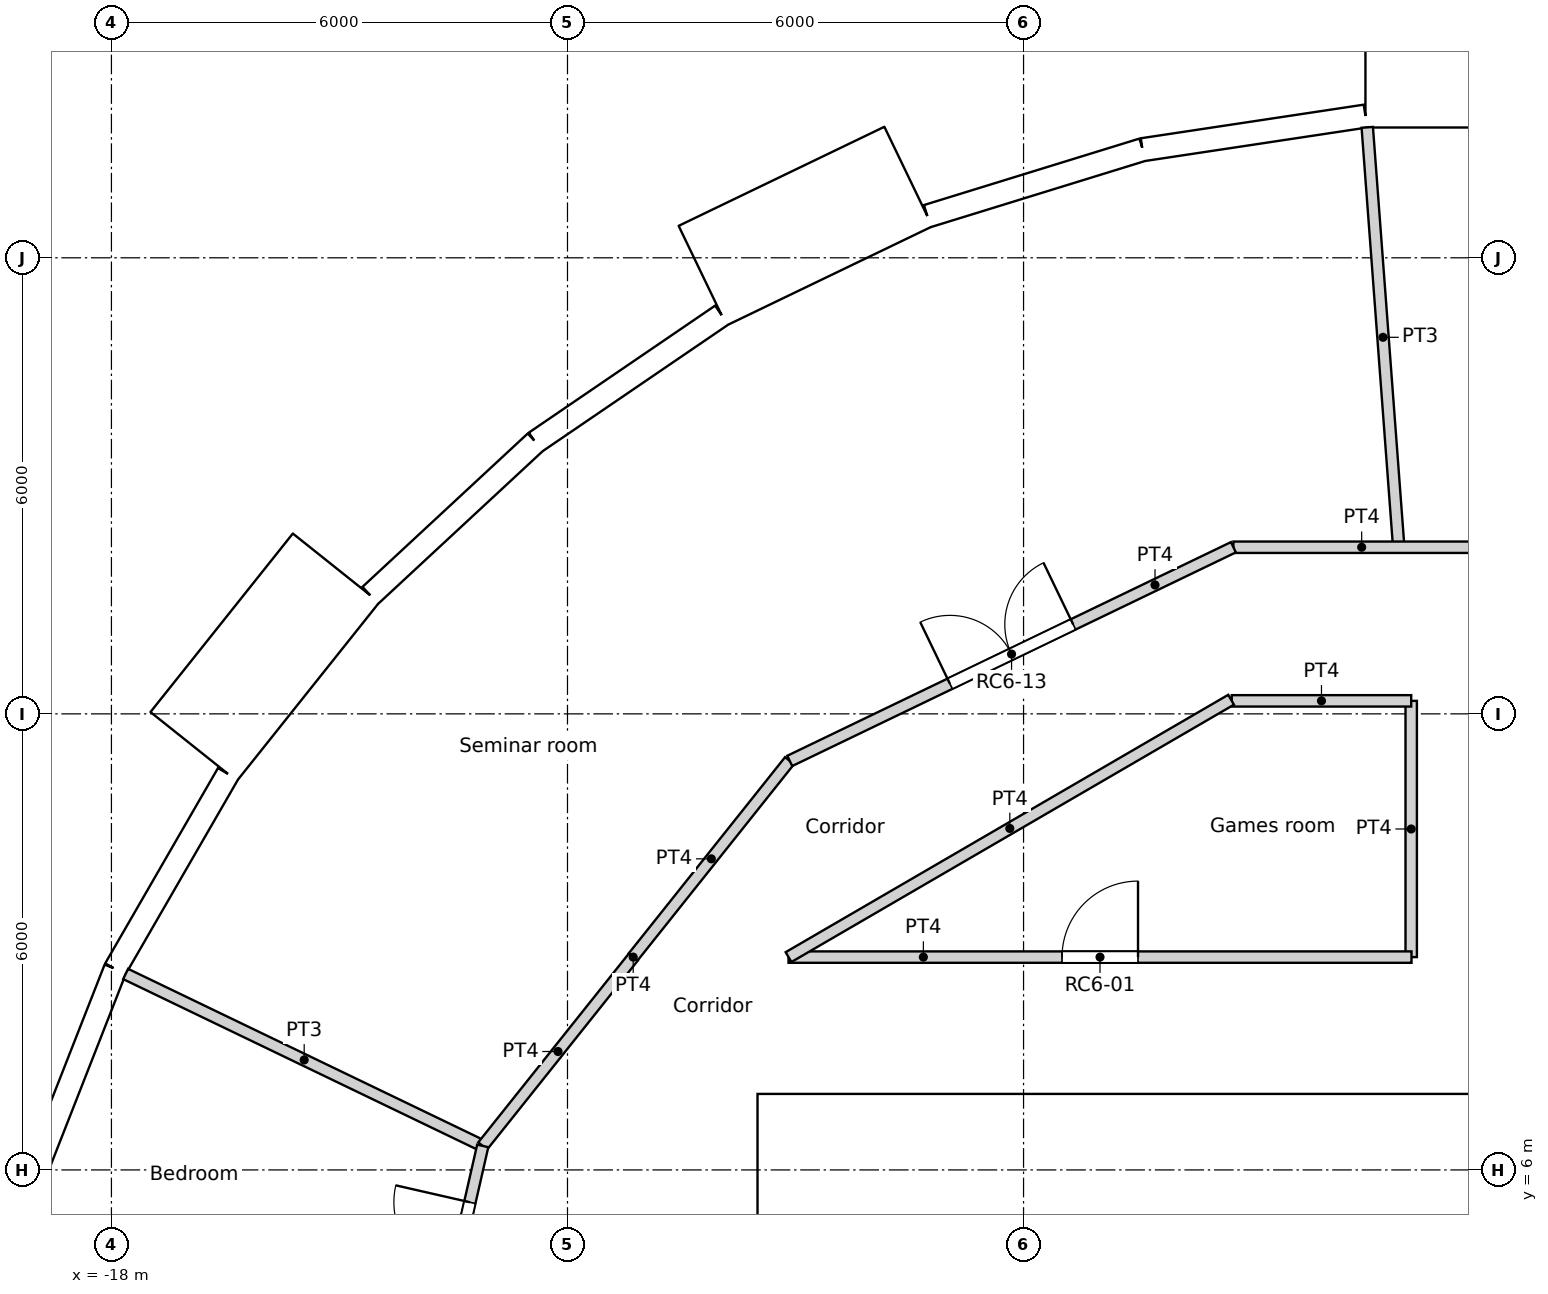
"""IFC4 building model, lengths in metres.
Left out: names, types, materials, properties, quantities, classifications, styles, units other than length and angle.
Written with IfcOpenShell. Run it as: python <this file> out.ifc"""

import sys

from ifc_helpers import new_model, si_unit, direction, frame, frame_2d, origin, origin_2d, place, context, subcontext, project, spatial, rectangle, circle, extrude, element, fill, save


model = new_model("IFC4")
c1 = context("Model", 3, precision=1e-05, world=origin(), true_north=direction((0.0, 1.0)))
c2 = subcontext(c1, "Body", "Model", "MODEL_VIEW")
j1 = project(units=[si_unit("LENGTHUNIT", "METRE"), si_unit("PLANEANGLEUNIT", "RADIAN")], contexts=[c1])
p1 = place(None, origin())
s1 = spatial("IfcSite", under=j1, at=p1, CompositionType="ELEMENT")
p2 = place(p1, origin())
s2 = spatial("IfcBuilding", under=s1, at=p2, CompositionType="ELEMENT")
p3 = place(p2, frame((0.0, 0.0, 283.8)))
s3 = spatial("IfcBuildingStorey", under=s2, at=p3, CompositionType="ELEMENT", Elevation=283.8)
for number, where, z_axis, x_axis in (
    (1, (-4.188, 18.35, 0.0), (0.0, 0.0, 1.0), (1.0, 0.0, 0.0)),
    (2, (-9.411, 16.301, 0.0), (0.0, 0.0, 1.0), (1.0, 0.0, 0.0)),
    (3, (-13.798, 12.802, 0.0), (0.0, 0.0, 1.0), (1.0, 0.0, 0.0)),
    (4, (-16.958, 8.167, 0.0), (0.0, 0.0, 1.0), (1.0, 0.0, 0.0)),
):
    element("IfcColumn", number, at=place(p3, frame(where, z_axis=z_axis, x_axis=x_axis)), inside=s3, PredefinedType="COLUMN", context=c2, shape_type="SweptSolid", body=[
        extrude(circle(Radius=0.45, at=origin_2d()), origin(), (0.0, 0.0, 1.0), 3.6),
    ])
p4 = place(p3, frame((1.5, 20.441, -0.35), z_axis=(0.0, 0.0, 1.0), x_axis=(-1.0, 0.0, 0.0)))
e5 = element("IfcWall", 5, at=p4, inside=s3, PredefinedType="ELEMENTEDWALL", context=c2, shape_type="SweptSolid", body=[
    extrude(rectangle(XDim=3.0, YDim=1.45, at=frame_2d((1.5, 0.0))), origin(), (0.0, 0.0, 1.0), 3.6),
])
p5 = place(p4, frame((1.5, 0.0, 1.9)))
e6 = element("IfcOpeningElement", 6, at=p5, cuts=e5, PredefinedType="OPENING", context=c2, shape_type="SweptSolid", body=[
    extrude(circle(Radius=0.9, at=origin_2d()), frame((0.0, 0.735, 0.0), z_axis=(0.0, -1.0, 0.0), x_axis=(1.0, 0.0, 0.0)), (0.0, 0.0, 1.0), 1.47),
])
p6 = place(p3, frame((-1.504, 19.864, 0.0), z_axis=(0.0, 0.0, 1.0), x_axis=(-0.988835775663, -0.149009425104, 0.0)))
e7 = element("IfcWall", 7, at=p6, inside=s3, PredefinedType="SOLIDWALL", context=c2, shape_type="SweptSolid", body=[
    extrude(rectangle(XDim=2.962, YDim=0.3, at=frame_2d((1.481, 0.0))), origin(), (0.0, 0.0, 1.0), 3.25),
])
p7 = place(p6, frame((1.481, 0.0, 1.55)))
e8 = element("IfcOpeningElement", 8, at=p7, cuts=e7, PredefinedType="OPENING", context=c2, shape_type="SweptSolid", body=[
    extrude(circle(Radius=0.9, at=origin_2d()), frame((0.0, 0.16, 0.0), z_axis=(0.0, -1.0, 0.0), x_axis=(1.0, 0.0, 0.0)), (0.0, 0.0, 1.0), 0.32),
])
p8 = place(p3, frame((-4.433, 19.422, 0.0), z_axis=(0.0, 0.0, 1.0), x_axis=(-0.955555982805, -0.29480970765, 0.0)))
e9 = element("IfcWall", 9, at=p8, inside=s3, PredefinedType="SOLIDWALL", context=c2, shape_type="SweptSolid", body=[
    extrude(rectangle(XDim=2.962, YDim=0.3, at=frame_2d((1.481, 0.0))), origin(), (0.0, 0.0, 1.0), 3.25),
])
p9 = place(p8, frame((1.481, 0.0, 1.55)))
e10 = element("IfcOpeningElement", 10, at=p9, cuts=e9, PredefinedType="OPENING", context=c2, shape_type="SweptSolid", body=[
    extrude(circle(Radius=0.9, at=origin_2d()), frame((0.0, 0.16, 0.0), z_axis=(0.0, -1.0, 0.0), x_axis=(1.0, 0.0, 0.0)), (0.0, 0.0, 1.0), 0.32),
])
p10 = place(p3, frame((-7.518, 19.068, -0.35), z_axis=(0.0, 0.0, 1.0), x_axis=(-0.900953362039, -0.433915935904, 0.0)))
e11 = element("IfcWall", 11, at=p10, inside=s3, PredefinedType="ELEMENTEDWALL", context=c2, shape_type="SweptSolid", body=[
    extrude(rectangle(XDim=3.0, YDim=1.45, at=frame_2d((1.5, 0.0))), origin(), (0.0, 0.0, 1.0), 3.6),
])
p11 = place(p10, frame((1.5, 0.0, 1.9)))
e12 = element("IfcOpeningElement", 12, at=p11, cuts=e11, PredefinedType="OPENING", context=c2, shape_type="SweptSolid", body=[
    extrude(circle(Radius=0.9, at=origin_2d()), frame((0.0, 0.735, 0.0), z_axis=(0.0, -1.0, 0.0), x_axis=(1.0, 0.0, 0.0)), (0.0, 0.0, 1.0), 1.47),
])
p12 = place(p3, frame((-9.974, 17.244, 0.0), z_axis=(0.0, 0.0, 1.0), x_axis=(-0.826236061068, -0.563324037646, 0.0)))
e13 = element("IfcWall", 13, at=p12, inside=s3, PredefinedType="SOLIDWALL", context=c2, shape_type="SweptSolid", body=[
    extrude(rectangle(XDim=2.962, YDim=0.3, at=frame_2d((1.481, 0.0))), origin(), (0.0, 0.0, 1.0), 3.25),
])
p13 = place(p12, frame((1.481, 0.0, 1.55)))
e14 = element("IfcOpeningElement", 14, at=p13, cuts=e13, PredefinedType="OPENING", context=c2, shape_type="SweptSolid", body=[
    extrude(circle(Radius=0.9, at=origin_2d()), frame((0.0, 0.16, 0.0), z_axis=(0.0, -1.0, 0.0), x_axis=(1.0, 0.0, 0.0)), (0.0, 0.0, 1.0), 0.32),
])
p14 = place(p3, frame((-12.421, 15.575, 0.0), z_axis=(0.0, 0.0, 1.0), x_axis=(-0.733028283666, -0.680198158882, 0.0)))
e15 = element("IfcWall", 15, at=p14, inside=s3, PredefinedType="SOLIDWALL", context=c2, shape_type="SweptSolid", body=[
    extrude(rectangle(XDim=2.962, YDim=0.3, at=frame_2d((1.481, 0.0))), origin(), (0.0, 0.0, 1.0), 3.25),
])
p15 = place(p14, frame((1.481, 0.0, 1.55)))
e16 = element("IfcOpeningElement", 16, at=p15, cuts=e15, PredefinedType="OPENING", context=c2, shape_type="SweptSolid", body=[
    extrude(circle(Radius=0.9, at=origin_2d()), frame((0.0, 0.16, 0.0), z_axis=(0.0, -1.0, 0.0), x_axis=(1.0, 0.0, 0.0)), (0.0, 0.0, 1.0), 0.32),
])
p16 = place(p3, frame((-15.046, 13.917, -0.35), z_axis=(0.0, 0.0, 1.0), x_axis=(-0.623523286312, -0.781804778335, 0.0)))
e17 = element("IfcWall", 17, at=p16, inside=s3, PredefinedType="ELEMENTEDWALL", context=c2, shape_type="SweptSolid", body=[
    extrude(rectangle(XDim=3.0, YDim=1.45, at=frame_2d((1.5, 0.0))), origin(), (0.0, 0.0, 1.0), 3.6),
])
p17 = place(p16, frame((1.5, 0.0, 1.9)))
e18 = element("IfcOpeningElement", 18, at=p17, cuts=e17, PredefinedType="OPENING", context=c2, shape_type="SweptSolid", body=[
    extrude(circle(Radius=0.9, at=origin_2d()), frame((0.0, 0.735, 0.0), z_axis=(0.0, -1.0, 0.0), x_axis=(1.0, 0.0, 0.0)), (0.0, 0.0, 1.0), 1.47),
])
p18 = place(p3, frame((-16.468, 11.209, 0.0), z_axis=(0.0, 0.0, 1.0), x_axis=(-0.500012570604, -0.866018146021, 0.0)))
e19 = element("IfcWall", 19, at=p18, inside=s3, PredefinedType="SOLIDWALL", context=c2, shape_type="SweptSolid", body=[
    extrude(rectangle(XDim=2.962, YDim=0.3, at=frame_2d((1.481, 0.0))), origin(), (0.0, 0.0, 1.0), 3.25),
])
p19 = place(p18, frame((1.481, 0.0, 1.55)))
e20 = element("IfcOpeningElement", 20, at=p19, cuts=e19, PredefinedType="OPENING", context=c2, shape_type="SweptSolid", body=[
    extrude(circle(Radius=0.9, at=origin_2d()), frame((0.0, 0.16, 0.0), z_axis=(0.0, -1.0, 0.0), x_axis=(1.0, 0.0, 0.0)), (0.0, 0.0, 1.0), 0.32),
])
p20 = place(p3, frame((-17.949, 8.644, 0.0), z_axis=(0.0, 0.0, 1.0), x_axis=(-0.365343821297, -0.930872650925, 0.0)))
e21 = element("IfcWall", 21, at=p20, inside=s3, PredefinedType="SOLIDWALL", context=c2, shape_type="SweptSolid", body=[
    extrude(rectangle(XDim=2.962, YDim=0.3, at=frame_2d((1.481, 0.0))), origin(), (0.0, 0.0, 1.0), 3.25),
])
p21 = place(p20, frame((1.481, 0.0, 1.55)))
e22 = element("IfcOpeningElement", 22, at=p21, cuts=e21, PredefinedType="OPENING", context=c2, shape_type="SweptSolid", body=[
    extrude(circle(Radius=0.9, at=origin_2d()), frame((0.0, 0.16, 0.0), z_axis=(0.0, -1.0, 0.0), x_axis=(1.0, 0.0, 0.0)), (0.0, 0.0, 1.0), 0.32),
])
p22 = place(p3, frame((-9.5, 6.7, 0.0), z_axis=(0.0, 0.0, 1.0), x_axis=(1.0, 0.0, 0.0)))
e23 = element("IfcWall", 23, at=p22, inside=s3, PredefinedType="SOLIDWALL", context=c2, shape_type="SweptSolid", body=[
    extrude(rectangle(XDim=19.0, YDim=0.6, at=frame_2d((9.5, 0.0))), origin(), (0.0, 0.0, 1.0), 3.6),
])
p23 = place(p22, frame((5.35, 0.0, 0.0)))
e24 = element("IfcOpeningElement", 24, at=p23, cuts=e23, PredefinedType="OPENING", context=c2, shape_type="SweptSolid", body=[
    extrude(rectangle(XDim=1.7, YDim=2.1, at=frame_2d((0.85, 1.05))), frame((0.0, 0.3, 0.0), z_axis=(0.0, -1.0, 0.0), x_axis=(1.0, 0.0, 0.0)), (0.0, 0.0, 1.0), 0.6),
])
p24 = place(p3, frame((-9.2, -6.4, 0.0), z_axis=(0.0, 0.0, 1.0), x_axis=(0.0, 1.0, 0.0)))
e25 = element("IfcWall", 25, at=p24, inside=s3, PredefinedType="SOLIDWALL", context=c2, shape_type="SweptSolid", body=[
    extrude(rectangle(XDim=12.8, YDim=0.6, at=frame_2d((6.4, 0.0))), origin(), (0.0, 0.0, 1.0), 3.6),
])
p25 = place(p3, frame((-2.25, 3.25, 0.0), z_axis=(0.0, 0.0, 1.0), x_axis=(0.0, 1.0, 0.0)))
e26 = element("IfcWall", 26, at=p25, inside=s3, PredefinedType="SOLIDWALL", context=c2, shape_type="SweptSolid", body=[
    extrude(rectangle(XDim=3.15, YDim=0.3, at=frame_2d((1.575, 0.0))), origin(), (0.0, 0.0, 1.0), 3.25),
])
p26 = place(p3, frame((-9.092, 8.8, 0.0), z_axis=(0.0, 0.0, 1.0), x_axis=(0.864470922103, 0.502682827277, 0.0)))
e27 = element("IfcWall", 27, at=p26, inside=s3, PredefinedType="PARTITIONING", context=c2, shape_type="SweptSolid", body=[
    extrude(rectangle(XDim=6.735, YDim=0.15, at=frame_2d((3.368, 0.0))), origin(), (0.0, 0.0, 1.0), 3.25),
])
p27 = place(p3, frame((-9.092, 8.8, 0.0), z_axis=(0.0, 0.0, 1.0), x_axis=(1.0, 0.0, 0.0)))
e28 = element("IfcWall", 28, at=p27, inside=s3, PredefinedType="PARTITIONING", context=c2, shape_type="SweptSolid", body=[
    extrude(rectangle(XDim=8.196, YDim=0.15, at=frame_2d((4.098, 0.0))), origin(), (0.0, 0.0, 1.0), 3.25),
])
p28 = place(p27, frame((3.598, 0.0, 0.0)))
e29 = element("IfcOpeningElement", 29, at=p28, cuts=e28, PredefinedType="OPENING", context=c2, shape_type="SweptSolid", body=[
    extrude(rectangle(XDim=1.0, YDim=2.04, at=frame_2d((0.5, 1.02))), frame((0.0, 0.075, 0.0), z_axis=(0.0, -1.0, 0.0), x_axis=(1.0, 0.0, 0.0)), (0.0, 0.0, 1.0), 0.15),
])
p29 = place(p3, frame((-11.134, 8.8, 0.0), z_axis=(0.0, 0.0, 1.0), x_axis=(-1.0, 0.0, 0.0)))
e30 = element("IfcWall", 30, at=p29, inside=s3, PredefinedType="PARTITIONING", context=c2, shape_type="SweptSolid", body=[
    extrude(rectangle(XDim=0.003, YDim=0.15, at=frame_2d((0.001, 0.0))), origin(), (0.0, 0.0, 1.0), 3.25),
])
p30 = place(p3, frame((-11.136, 8.802, 0.0), z_axis=(0.0, 0.0, 1.0), x_axis=(0.623151397235, 0.782101231379, 0.0)))
e31 = element("IfcWall", 31, at=p30, inside=s3, PredefinedType="PARTITIONING", context=c2, shape_type="SweptSolid", body=[
    extrude(rectangle(XDim=3.301, YDim=0.15, at=frame_2d((1.65, 0.0))), origin(), (0.0, 0.0, 1.0), 3.25),
])
p31 = place(p3, frame((-0.9, 8.8, 0.0), z_axis=(0.0, 0.0, 1.0), x_axis=(0.0, 1.0, 0.0)))
e32 = element("IfcWall", 32, at=p31, inside=s3, PredefinedType="PARTITIONING", context=c2, shape_type="SweptSolid", body=[
    extrude(rectangle(XDim=3.371, YDim=0.15, at=frame_2d((1.686, 0.0))), origin(), (0.0, 0.0, 1.0), 3.25),
])
p32 = place(p3, frame((-3.261, 12.171, 0.0), z_axis=(0.0, 0.0, 1.0), x_axis=(1.0, 0.0, 0.0)))
e33 = element("IfcWall", 33, at=p32, inside=s3, PredefinedType="PARTITIONING", context=c2, shape_type="SweptSolid", body=[
    extrude(rectangle(XDim=2.361, YDim=0.15, at=frame_2d((1.181, 0.0))), origin(), (0.0, 0.0, 1.0), 3.25),
])
p33 = place(p3, frame((-3.239, 14.192, 0.0), z_axis=(0.0, 0.0, 1.0), x_axis=(1.0, 0.0, 0.0)))
e34 = element("IfcWall", 34, at=p33, inside=s3, PredefinedType="PARTITIONING", context=c2, shape_type="SweptSolid", body=[
    extrude(rectangle(XDim=6.478, YDim=0.15, at=frame_2d((3.239, 0.0))), origin(), (0.0, 0.0, 1.0), 3.25),
])
p34 = place(p33, frame((3.425, 0.0, 0.0)))
e35 = element("IfcOpeningElement", 35, at=p34, cuts=e34, PredefinedType="OPENING", context=c2, shape_type="SweptSolid", body=[
    extrude(rectangle(XDim=1.8, YDim=2.1, at=frame_2d((0.9, 1.05))), frame((0.0, 0.075, 0.0), z_axis=(0.0, -1.0, 0.0), x_axis=(1.0, 0.0, 0.0)), (0.0, 0.0, 1.0), 0.15),
])
p35 = place(p3, frame((-9.076, 11.381, 0.0), z_axis=(0.0, 0.0, 1.0), x_axis=(0.900976027191, 0.433868872388, 0.0)))
e36 = element("IfcWall", 36, at=p35, inside=s3, PredefinedType="PARTITIONING", context=c2, shape_type="SweptSolid", body=[
    extrude(rectangle(XDim=6.479, YDim=0.15, at=frame_2d((3.239, 0.0))), origin(), (0.0, 0.0, 1.0), 3.25),
])
p36 = place(p35, frame((2.339, 0.0, 0.0)))
e37 = element("IfcOpeningElement", 37, at=p36, cuts=e36, PredefinedType="OPENING", context=c2, shape_type="SweptSolid", body=[
    extrude(rectangle(XDim=1.8, YDim=2.1, at=frame_2d((0.9, 1.05))), frame((0.0, 0.075, 0.0), z_axis=(0.0, -1.0, 0.0), x_axis=(1.0, 0.0, 0.0)), (0.0, 0.0, 1.0), 0.15),
])
p37 = place(p3, frame((-13.115, 6.316, 0.0), z_axis=(0.0, 0.0, 1.0), x_axis=(0.623476099415, 0.781842409606, 0.0)))
e38 = element("IfcWall", 38, at=p37, inside=s3, PredefinedType="PARTITIONING", context=c2, shape_type="SweptSolid", body=[
    extrude(rectangle(XDim=3.177, YDim=0.15, at=frame_2d((1.589, 0.0))), origin(), (0.0, 0.0, 1.0), 3.25),
])
p38 = place(p3, frame((-14.557, 0.0, 0.0), z_axis=(0.0, 0.0, 1.0), x_axis=(0.222533159771, 0.974925121639, 0.0)))
e39 = element("IfcWall", 39, at=p38, inside=s3, PredefinedType="PARTITIONING", context=c2, shape_type="SweptSolid", body=[
    extrude(rectangle(XDim=6.478, YDim=0.15, at=frame_2d((3.239, 0.0))), origin(), (0.0, 0.0, 1.0), 3.25),
])
p39 = place(p38, frame((4.718, 0.0, 0.0)))
e40 = element("IfcOpeningElement", 40, at=p39, cuts=e39, PredefinedType="OPENING", context=c2, shape_type="SweptSolid", body=[
    extrude(rectangle(XDim=1.0, YDim=2.1, at=frame_2d((0.5, 1.05))), frame((0.0, 0.075, 0.0), z_axis=(0.0, -1.0, 0.0), x_axis=(1.0, 0.0, 0.0)), (0.0, 0.0, 1.0), 0.15),
])
p40 = place(p3, frame((-1.478, 19.716, 0.0), z_axis=(0.0, 0.0, 1.0), x_axis=(0.074745027699, -0.997202677912, 0.0)))
e41 = element("IfcWall", 41, at=p40, inside=s3, PredefinedType="PARTITIONING", context=c2, shape_type="SweptSolid", body=[
    extrude(rectangle(XDim=5.54, YDim=0.15, at=frame_2d((2.77, 0.0))), origin(), (0.0, 0.0, 1.0), 3.25),
])
p41 = place(p3, frame((-17.813, 8.578, 0.0), z_axis=(0.0, 0.0, 1.0), x_axis=(0.901004381064, -0.433809987557, 0.0)))
e42 = element("IfcWall", 42, at=p41, inside=s3, PredefinedType="PARTITIONING", context=c2, shape_type="SweptSolid", body=[
    extrude(rectangle(XDim=5.214, YDim=0.15, at=frame_2d((2.607, 0.0))), origin(), (0.0, 0.0, 1.0), 3.25),
])
p42 = place(p5, origin())
e43 = element("IfcWindow", 43, at=p42, inside=s3, PartitioningType="SINGLE_PANEL", PredefinedType="WINDOW", context=c2, shape_type="SweptSolid", body=[
    extrude(circle(Radius=0.9, at=origin_2d()), frame((0.0, 0.695, 0.0), z_axis=(0.0, -1.0, 0.0), x_axis=(1.0, 0.0, 0.0)), (0.0, 0.0, 1.0), 0.1),
])
fill(e6, e43)
p43 = place(p7, origin())
e44 = element("IfcWindow", 44, at=p43, inside=s3, PartitioningType="SINGLE_PANEL", PredefinedType="WINDOW", context=c2, shape_type="SweptSolid", body=[
    extrude(circle(Radius=0.9, at=origin_2d()), frame((0.0, 0.12, 0.0), z_axis=(0.0, -1.0, 0.0), x_axis=(1.0, 0.0, 0.0)), (0.0, 0.0, 1.0), 0.1),
])
fill(e8, e44)
p44 = place(p9, origin())
e45 = element("IfcWindow", 45, at=p44, inside=s3, PartitioningType="SINGLE_PANEL", PredefinedType="WINDOW", context=c2, shape_type="SweptSolid", body=[
    extrude(circle(Radius=0.9, at=origin_2d()), frame((0.0, 0.12, 0.0), z_axis=(0.0, -1.0, 0.0), x_axis=(1.0, 0.0, 0.0)), (0.0, 0.0, 1.0), 0.1),
])
fill(e10, e45)
p45 = place(p11, origin())
e46 = element("IfcWindow", 46, at=p45, inside=s3, PartitioningType="SINGLE_PANEL", PredefinedType="WINDOW", context=c2, shape_type="SweptSolid", body=[
    extrude(circle(Radius=0.9, at=origin_2d()), frame((0.0, 0.695, 0.0), z_axis=(0.0, -1.0, 0.0), x_axis=(1.0, 0.0, 0.0)), (0.0, 0.0, 1.0), 0.1),
])
fill(e12, e46)
p46 = place(p13, origin())
e47 = element("IfcWindow", 47, at=p46, inside=s3, PartitioningType="SINGLE_PANEL", PredefinedType="WINDOW", context=c2, shape_type="SweptSolid", body=[
    extrude(circle(Radius=0.9, at=origin_2d()), frame((0.0, 0.12, 0.0), z_axis=(0.0, -1.0, 0.0), x_axis=(1.0, 0.0, 0.0)), (0.0, 0.0, 1.0), 0.1),
])
fill(e14, e47)
p47 = place(p15, origin())
e48 = element("IfcWindow", 48, at=p47, inside=s3, PartitioningType="SINGLE_PANEL", PredefinedType="WINDOW", context=c2, shape_type="SweptSolid", body=[
    extrude(circle(Radius=0.9, at=origin_2d()), frame((0.0, 0.12, 0.0), z_axis=(0.0, -1.0, 0.0), x_axis=(1.0, 0.0, 0.0)), (0.0, 0.0, 1.0), 0.1),
])
fill(e16, e48)
p48 = place(p17, origin())
e49 = element("IfcWindow", 49, at=p48, inside=s3, PartitioningType="SINGLE_PANEL", PredefinedType="WINDOW", context=c2, shape_type="SweptSolid", body=[
    extrude(circle(Radius=0.9, at=origin_2d()), frame((0.0, 0.695, 0.0), z_axis=(0.0, -1.0, 0.0), x_axis=(1.0, 0.0, 0.0)), (0.0, 0.0, 1.0), 0.1),
])
fill(e18, e49)
p49 = place(p19, origin())
e50 = element("IfcWindow", 50, at=p49, inside=s3, PartitioningType="SINGLE_PANEL", PredefinedType="WINDOW", context=c2, shape_type="SweptSolid", body=[
    extrude(circle(Radius=0.9, at=origin_2d()), frame((0.0, 0.12, 0.0), z_axis=(0.0, -1.0, 0.0), x_axis=(1.0, 0.0, 0.0)), (0.0, 0.0, 1.0), 0.1),
])
fill(e20, e50)
p50 = place(p21, origin())
e51 = element("IfcWindow", 51, at=p50, inside=s3, PartitioningType="SINGLE_PANEL", PredefinedType="WINDOW", context=c2, shape_type="SweptSolid", body=[
    extrude(circle(Radius=0.9, at=origin_2d()), frame((0.0, 0.12, 0.0), z_axis=(0.0, -1.0, 0.0), x_axis=(1.0, 0.0, 0.0)), (0.0, 0.0, 1.0), 0.1),
])
fill(e22, e51)
p51 = place(p23, origin())
e52 = element("IfcDoor", 52, at=p51, inside=s3, OperationType="DOUBLE_DOOR_SINGLE_SWING", PredefinedType="DOOR", context=c2, shape_type="SweptSolid", body=[
    extrude(rectangle(XDim=1.7, YDim=2.1, at=frame_2d((0.85, 1.05))), frame((0.0, 0.025, 0.0), z_axis=(0.0, -1.0, 0.0), x_axis=(1.0, 0.0, 0.0)), (0.0, 0.0, 1.0), 0.05),
])
fill(e24, e52)
p52 = place(p28, origin())
e53 = element("IfcDoor", 53, at=p52, inside=s3, OperationType="SINGLE_SWING_RIGHT", PredefinedType="DOOR", context=c2, shape_type="SweptSolid", body=[
    extrude(rectangle(XDim=1.0, YDim=2.04, at=frame_2d((0.5, 1.02))), frame((0.0, 0.025, 0.0), z_axis=(0.0, -1.0, 0.0), x_axis=(1.0, 0.0, 0.0)), (0.0, 0.0, 1.0), 0.05),
])
fill(e29, e53)
p53 = place(p36, origin())
e54 = element("IfcDoor", 54, at=p53, inside=s3, OperationType="DOUBLE_DOOR_SINGLE_SWING", PredefinedType="DOOR", context=c2, shape_type="SweptSolid", body=[
    extrude(rectangle(XDim=1.8, YDim=2.1, at=frame_2d((0.9, 1.05))), frame((0.0, 0.025, 0.0), z_axis=(0.0, -1.0, 0.0), x_axis=(1.0, 0.0, 0.0)), (0.0, 0.0, 1.0), 0.05),
])
fill(e37, e54)
p54 = place(p39, origin())
e55 = element("IfcDoor", 55, at=p54, inside=s3, OperationType="SINGLE_SWING_RIGHT", PredefinedType="DOOR", context=c2, shape_type="SweptSolid", body=[
    extrude(rectangle(XDim=1.0, YDim=2.1, at=frame_2d((0.5, 1.05))), frame((0.0, 0.025, 0.0), z_axis=(0.0, -1.0, 0.0), x_axis=(1.0, 0.0, 0.0)), (0.0, 0.0, 1.0), 0.05),
])
fill(e40, e55)
save(model, sys.argv[1])
